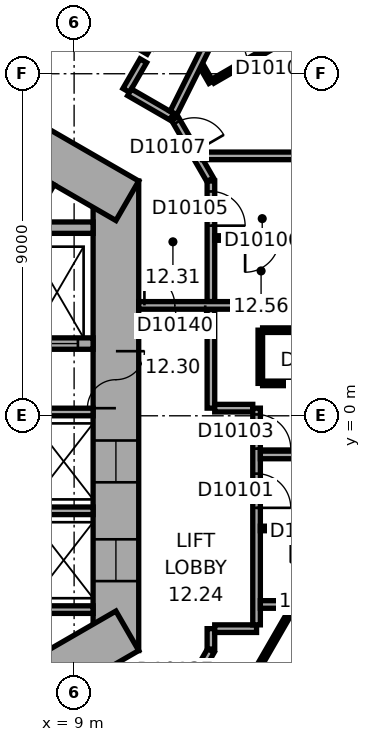
"""IFC4 building model, lengths in metres.
Left out: names, types, materials, properties, quantities, classifications, styles, units other than length and angle.
Written with IfcOpenShell. Run it as: python <this file> out.ifc"""

import sys

from ifc_helpers import new_model, si_unit, direction, frame, frame_2d, origin, place, context, subcontext, project, spatial, rectangle, extrude, element, fill, save


model = new_model("IFC4")
c1 = context("Model", 3, precision=1e-05, world=origin(), true_north=direction((0.0, 1.0)))
c2 = subcontext(c1, "Body", "Model", "MODEL_VIEW")
j1 = project(units=[si_unit("LENGTHUNIT", "METRE"), si_unit("PLANEANGLEUNIT", "RADIAN")], contexts=[c1])
p1 = place(None, origin())
s1 = spatial("IfcSite", under=j1, at=p1, CompositionType="ELEMENT")
p2 = place(p1, origin())
s2 = spatial("IfcBuilding", under=s1, at=p2, CompositionType="ELEMENT")
p3 = place(p2, frame((0.0, 0.0, 60.5)))
s3 = spatial("IfcBuildingStorey", under=s2, at=p3, CompositionType="ELEMENT", Elevation=60.5)
p4 = place(p3, frame((10.1, -6.177, 0.0), z_axis=(0.0, 0.0, 1.0), x_axis=(0.0, 1.0, 0.0)))
e1 = element("IfcWall", 1, at=p4, inside=s3, PredefinedType="SHEAR", context=c2, shape_type="SweptSolid", body=[
    extrude(rectangle(XDim=12.355, YDim=1.2, at=frame_2d((6.177, 0.0))), origin(), (0.0, 0.0, 1.0), 3.3),
])
p5 = place(p4, frame((6.378, 0.0, 0.0)))
e2 = element("IfcOpeningElement", 2, at=p5, cuts=e1, PredefinedType="OPENING", context=c2, shape_type="SweptSolid", body=[
    extrude(rectangle(XDim=1.5, YDim=2.1, at=frame_2d((0.75, 1.05))), frame((0.0, 0.61, 0.0), z_axis=(0.0, -1.0, 0.0), x_axis=(1.0, 0.0, 0.0)), (0.0, 0.0, 1.0), 1.22),
])
p6 = place(p4, frame((1.828, 0.0, 0.0)))
e3 = element("IfcOpeningElement", 3, at=p6, cuts=e1, PredefinedType="OPENING", context=c2, shape_type="SweptSolid", body=[
    extrude(rectangle(XDim=1.1, YDim=2.1, at=frame_2d((0.55, 1.05))), frame((0.0, 0.61, 0.0), z_axis=(0.0, -1.0, 0.0), x_axis=(1.0, 0.0, 0.0)), (0.0, 0.0, 1.0), 1.22),
])
p7 = place(p4, frame((4.427, 0.0, 0.0)))
e4 = element("IfcOpeningElement", 4, at=p7, cuts=e1, PredefinedType="OPENING", context=c2, shape_type="SweptSolid", body=[
    extrude(rectangle(XDim=1.1, YDim=2.1, at=frame_2d((0.55, 1.05))), frame((0.0, 0.61, 0.0), z_axis=(0.0, -1.0, 0.0), x_axis=(1.0, 0.0, 0.0)), (0.0, 0.0, 1.0), 1.22),
])
p8 = place(p3, frame((10.4, 5.658, 0.0), z_axis=(0.0, 0.0, 1.0), x_axis=(-0.866021384402, 0.500006961711, 0.0)))
e5 = element("IfcWall", 5, at=p8, inside=s3, PredefinedType="SHEAR", context=c2, shape_type="SweptSolid", body=[
    extrude(rectangle(XDim=12.355, YDim=1.2, at=frame_2d((6.178, 0.0))), origin(), (0.0, 0.0, 1.0), 3.3),
])
p9 = place(p8, frame((2.728, 0.0, 0.0)))
e6 = element("IfcOpeningElement", 6, at=p9, cuts=e5, PredefinedType="OPENING", context=c2, shape_type="SweptSolid", body=[
    extrude(rectangle(XDim=1.1, YDim=2.1, at=frame_2d((0.55, 1.05))), frame((0.0, 0.61, 0.0), z_axis=(0.0, -1.0, 0.0), x_axis=(1.0, 0.0, 0.0)), (0.0, 0.0, 1.0), 1.22),
])
p10 = place(p8, frame((5.328, 0.0, 0.0)))
e7 = element("IfcOpeningElement", 7, at=p10, cuts=e5, PredefinedType="OPENING", context=c2, shape_type="SweptSolid", body=[
    extrude(rectangle(XDim=1.1, YDim=2.1, at=frame_2d((0.55, 1.05))), frame((0.0, 0.61, 0.0), z_axis=(0.0, -1.0, 0.0), x_axis=(1.0, 0.0, 0.0)), (0.0, 0.0, 1.0), 1.22),
])
p11 = place(p8, frame((7.928, 0.0, 0.0)))
e8 = element("IfcOpeningElement", 8, at=p11, cuts=e5, PredefinedType="OPENING", context=c2, shape_type="SweptSolid", body=[
    extrude(rectangle(XDim=1.1, YDim=2.1, at=frame_2d((0.55, 1.05))), frame((0.0, 0.61, 0.0), z_axis=(0.0, -1.0, 0.0), x_axis=(1.0, 0.0, 0.0)), (0.0, 0.0, 1.0), 1.22),
])
p12 = place(p3, frame((-0.3, -11.836, 0.0), z_axis=(0.0, 0.0, 1.0), x_axis=(0.866021384402, 0.500006961711, 0.0)))
e9 = element("IfcWall", 9, at=p12, inside=s3, PredefinedType="SHEAR", context=c2, shape_type="SweptSolid", body=[
    extrude(rectangle(XDim=12.355, YDim=1.2, at=frame_2d((6.178, 0.0))), origin(), (0.0, 0.0, 1.0), 3.3),
])
p13 = place(p12, frame((4.128, 0.0, 0.0)))
e10 = element("IfcOpeningElement", 10, at=p13, cuts=e9, PredefinedType="OPENING", context=c2, shape_type="SweptSolid", body=[
    extrude(rectangle(XDim=0.9, YDim=2.1, at=frame_2d((0.45, 1.05))), frame((0.0, 0.61, 0.0), z_axis=(0.0, -1.0, 0.0), x_axis=(1.0, 0.0, 0.0)), (0.0, 0.0, 1.0), 1.22),
])
p14 = place(p12, frame((7.928, 0.0, 0.0)))
e11 = element("IfcOpeningElement", 11, at=p14, cuts=e9, PredefinedType="OPENING", context=c2, shape_type="SweptSolid", body=[
    extrude(rectangle(XDim=1.1, YDim=2.1, at=frame_2d((0.55, 1.05))), frame((0.0, 0.61, 0.0), z_axis=(0.0, -1.0, 0.0), x_axis=(1.0, 0.0, 0.0)), (0.0, 0.0, 1.0), 1.22),
])
for number, where, z_axis, x_axis in (
    (12, (7.3, -5.1, 0.0), (0.0, 0.0, 1.0), (1.0, 0.0, 0.0)),
    (13, (7.3, -2.5, 0.0), (0.0, 0.0, 1.0), (1.0, 0.0, 0.0)),
    (14, (7.3, 0.1, 0.0), (0.0, 0.0, 1.0), (1.0, 0.0, 0.0)),
    (15, (7.287, 4.222, 0.0), (0.0, 0.0, 1.0), (0.5, 0.866, 0.0)),
):
    element("IfcWall", number, at=place(p3, frame(where, z_axis=z_axis, x_axis=x_axis)), inside=s3, PredefinedType="PARTITIONING", context=c2, shape_type="SweptSolid", body=[
        extrude(rectangle(XDim=2.2, YDim=0.2, at=frame_2d((1.1, 0.0))), origin(), (0.0, 0.0, 1.0), 3.05),
    ])
p15 = place(p3, frame((7.3, 1.9, 0.0), z_axis=(0.0, 0.0, 1.0), x_axis=(1.0, 0.0, 0.0)))
e16 = element("IfcWall", 16, at=p15, inside=s3, PredefinedType="SHEAR", context=c2, shape_type="SweptSolid", body=[
    extrude(rectangle(XDim=2.2, YDim=0.3, at=frame_2d((1.1, 0.0))), origin(), (0.0, 0.0, 1.0), 3.05),
])
p16 = place(p15, frame((0.7, 0.0, 0.0)))
e17 = element("IfcOpeningElement", 17, at=p16, cuts=e16, PredefinedType="OPENING", context=c2, shape_type="SweptSolid", body=[
    extrude(rectangle(XDim=1.1, YDim=2.1, at=frame_2d((0.55, 1.05))), frame((0.0, 0.16, 0.0), z_axis=(0.0, -1.0, 0.0), x_axis=(1.0, 0.0, 0.0)), (0.0, 0.0, 1.0), 0.32),
])
p17 = place(p3, frame((7.3, 4.95, 0.0), z_axis=(0.0, 0.0, 1.0), x_axis=(1.0, 0.0, 0.0)))
e18 = element("IfcWall", 18, at=p17, inside=s3, PredefinedType="SHEAR", context=c2, shape_type="SweptSolid", body=[
    extrude(rectangle(XDim=2.2, YDim=0.3, at=frame_2d((1.1, 0.0))), origin(), (0.0, 0.0, 1.0), 3.05),
])
p18 = place(p3, frame((10.371, 8.561, 0.0), z_axis=(0.0, 0.0, 1.0), x_axis=(0.50004290449, 0.866000631449, 0.0)))
e19 = element("IfcWall", 19, at=p18, inside=s3, PredefinedType="PARTITIONING", context=c2, shape_type="SweptSolid", body=[
    extrude(rectangle(XDim=0.901, YDim=0.2, at=frame_2d((0.451, 0.0))), origin(), (0.0, 0.0, 1.0), 3.05),
])
p19 = place(p3, frame((10.972, 9.602, 0.0), z_axis=(0.0, 0.0, 1.0), x_axis=(-0.866033277307, 0.499986362411, 0.0)))
e20 = element("IfcWall", 20, at=p19, inside=s3, PredefinedType="PARTITIONING", context=c2, shape_type="SweptSolid", body=[
    extrude(rectangle(XDim=8.702, YDim=0.2, at=frame_2d((4.351, 0.0))), origin(), (0.0, 0.0, 1.0), 3.05),
])
p20 = place(p19, frame((4.364, 0.0, 0.0)))
e21 = element("IfcOpeningElement", 21, at=p20, cuts=e20, PredefinedType="OPENING", context=c2, shape_type="SweptSolid", body=[
    extrude(rectangle(XDim=0.9, YDim=2.1, at=frame_2d((0.45, 1.05))), frame((0.0, 0.11, 0.0), z_axis=(0.0, -1.0, 0.0), x_axis=(1.0, 0.0, 0.0)), (0.0, 0.0, 1.0), 0.22),
])
p21 = place(p3, frame((11.566, 7.871, 0.0), z_axis=(0.0, 0.0, 1.0), x_axis=(-0.866004557827, 0.500036104519, 0.0)))
e22 = element("IfcWall", 22, at=p21, inside=s3, PredefinedType="PARTITIONING", context=c2, shape_type="SweptSolid", body=[
    extrude(rectangle(XDim=1.28, YDim=0.2, at=frame_2d((0.64, 0.0))), origin(), (0.0, 0.0, 1.0), 3.05),
])
p22 = place(p3, frame((11.67, -7.788, 0.0), z_axis=(0.0, 0.0, 1.0), x_axis=(0.500063286585, 0.865988862174, 0.0)))
e23 = element("IfcWall", 23, at=p22, inside=s3, PredefinedType="PARTITIONING", context=c2, shape_type="SweptSolid", body=[
    extrude(rectangle(XDim=1.86, YDim=0.2, at=frame_2d((0.93, 0.0))), origin(), (0.0, 0.0, 1.0), 3.05),
])
p23 = place(p22, frame((0.48, 0.0, 0.0)))
e24 = element("IfcOpeningElement", 24, at=p23, cuts=e23, PredefinedType="OPENING", context=c2, shape_type="SweptSolid", body=[
    extrude(rectangle(XDim=0.9, YDim=2.1, at=frame_2d((0.45, 1.05))), frame((0.0, 0.11, 0.0), z_axis=(0.0, -1.0, 0.0), x_axis=(1.0, 0.0, 0.0)), (0.0, 0.0, 1.0), 0.22),
])
p24 = place(p3, frame((12.58, 6.212, 0.0), z_axis=(0.0, 0.0, 1.0), x_axis=(-0.500063286585, 0.865988862174, 0.0)))
e25 = element("IfcWall", 25, at=p24, inside=s3, PredefinedType="PARTITIONING", context=c2, shape_type="SweptSolid", body=[
    extrude(rectangle(XDim=1.86, YDim=0.2, at=frame_2d((0.93, 0.0))), origin(), (0.0, 0.0, 1.0), 3.05),
])
p25 = place(p24, frame((0.842, 0.0, 0.0)))
e26 = element("IfcOpeningElement", 26, at=p25, cuts=e25, PredefinedType="OPENING", context=c2, shape_type="SweptSolid", body=[
    extrude(rectangle(XDim=0.9, YDim=2.1, at=frame_2d((0.45, 1.05))), frame((0.0, 0.11, 0.0), z_axis=(0.0, -1.0, 0.0), x_axis=(1.0, 0.0, 0.0)), (0.0, 0.0, 1.0), 0.22),
])
p26 = place(p3, frame((12.6, -6.138, 0.0), z_axis=(0.0, 0.0, 1.0), x_axis=(0.0, 1.0, 0.0)))
e27 = element("IfcWall", 27, at=p26, inside=s3, PredefinedType="PARTITIONING", context=c2, shape_type="SweptSolid", body=[
    extrude(rectangle(XDim=0.537, YDim=0.2, at=frame_2d((0.268, 0.0))), origin(), (0.0, 0.0, 1.0), 3.05),
])
p27 = place(p3, frame((12.6, 0.201, 0.0), z_axis=(0.0, 0.0, 1.0), x_axis=(0.0, 1.0, 0.0)))
e28 = element("IfcWall", 28, at=p27, inside=s3, PredefinedType="PARTITIONING", context=c2, shape_type="SweptSolid", body=[
    extrude(rectangle(XDim=2.604, YDim=0.2, at=frame_2d((1.302, 0.0))), origin(), (0.0, 0.0, 1.0), 3.05),
])
p28 = place(p3, frame((12.6, 3.004, 0.0), z_axis=(0.0, 0.0, 1.0), x_axis=(0.0, 1.0, 0.0)))
e29 = element("IfcWall", 29, at=p28, inside=s3, PredefinedType="PARTITIONING", context=c2, shape_type="SweptSolid", body=[
    extrude(rectangle(XDim=3.173, YDim=0.2, at=frame_2d((1.586, 0.0))), origin(), (0.0, 0.0, 1.0), 3.05),
])
p29 = place(p28, frame((1.998, 0.0, 0.0)))
e30 = element("IfcOpeningElement", 30, at=p29, cuts=e29, PredefinedType="OPENING", context=c2, shape_type="SweptSolid", body=[
    extrude(rectangle(XDim=0.9, YDim=2.1, at=frame_2d((0.45, 1.05))), frame((0.0, 0.11, 0.0), z_axis=(0.0, -1.0, 0.0), x_axis=(1.0, 0.0, 0.0)), (0.0, 0.0, 1.0), 0.22),
])
p30 = place(p3, frame((12.601, 8.776, 0.0), z_axis=(0.0, 0.0, 1.0), x_axis=(-0.500166486798, 0.865929261247, 0.0)))
e31 = element("IfcWall", 31, at=p30, inside=s3, PredefinedType="PARTITIONING", context=c2, shape_type="SweptSolid", body=[
    extrude(rectangle(XDim=0.476, YDim=0.12, at=frame_2d((0.238, 0.0))), origin(), (0.0, 0.0, 1.0), 3.05),
])
p31 = place(p3, frame((12.7, -5.601, 0.0), z_axis=(0.0, 0.0, 1.0), x_axis=(1.0, 0.0, 0.0)))
e32 = element("IfcWall", 32, at=p31, inside=s3, PredefinedType="PARTITIONING", context=c2, shape_type="SweptSolid", body=[
    extrude(rectangle(XDim=1.101, YDim=0.2, at=frame_2d((0.551, 0.0))), origin(), (0.0, 0.0, 1.0), 3.05),
])
p32 = place(p3, frame((12.7, 4.677, 0.0), z_axis=(0.0, 0.0, 1.0), x_axis=(1.0, 0.0, 0.0)))
e33 = element("IfcWall", 33, at=p32, inside=s3, PredefinedType="PARTITIONING", context=c2, shape_type="SweptSolid", body=[
    extrude(rectangle(XDim=2.5, YDim=0.12, at=frame_2d((1.25, 0.0))), origin(), (0.0, 0.0, 1.0), 3.05),
])
p33 = place(p32, frame((0.8, 0.0, 0.0)))
e34 = element("IfcOpeningElement", 34, at=p33, cuts=e33, PredefinedType="OPENING", context=c2, shape_type="SweptSolid", body=[
    extrude(rectangle(XDim=0.9, YDim=2.1, at=frame_2d((0.45, 1.05))), frame((0.0, 0.07, 0.0), z_axis=(0.0, -1.0, 0.0), x_axis=(1.0, 0.0, 0.0)), (0.0, 0.0, 1.0), 0.14),
])
p34 = place(p3, frame((13.701, 0.201, 0.0), z_axis=(0.0, 0.0, 1.0), x_axis=(-1.0, 0.0, 0.0)))
e35 = element("IfcWall", 35, at=p34, inside=s3, PredefinedType="PARTITIONING", context=c2, shape_type="SweptSolid", body=[
    extrude(rectangle(XDim=1.001, YDim=0.2, at=frame_2d((0.5, 0.0))), origin(), (0.0, 0.0, 1.0), 3.05),
])
p35 = place(p3, frame((13.801, -5.501, 0.0), z_axis=(0.0, 0.0, 1.0), x_axis=(0.0, 1.0, 0.0)))
e36 = element("IfcWall", 36, at=p35, inside=s3, PredefinedType="PARTITIONING", context=c2, shape_type="SweptSolid", body=[
    extrude(rectangle(XDim=5.702, YDim=0.2, at=frame_2d((2.851, 0.0))), origin(), (0.0, 0.0, 1.0), 3.05),
])
p36 = place(p35, frame((3.079, 0.0, 0.0)))
e37 = element("IfcOpeningElement", 37, at=p36, cuts=e36, PredefinedType="OPENING", context=c2, shape_type="SweptSolid", body=[
    extrude(rectangle(XDim=0.9, YDim=2.1, at=frame_2d((0.45, 1.05))), frame((0.0, 0.11, 0.0), z_axis=(0.0, -1.0, 0.0), x_axis=(1.0, 0.0, 0.0)), (0.0, 0.0, 1.0), 0.22),
])
p37 = place(p35, frame((4.636, 0.0, 0.0)))
e38 = element("IfcOpeningElement", 38, at=p37, cuts=e36, PredefinedType="OPENING", context=c2, shape_type="SweptSolid", body=[
    extrude(rectangle(XDim=0.9, YDim=2.1, at=frame_2d((0.45, 1.05))), frame((0.0, 0.11, 0.0), z_axis=(0.0, -1.0, 0.0), x_axis=(1.0, 0.0, 0.0)), (0.0, 0.0, 1.0), 0.22),
])
p38 = place(p3, frame((13.901, -6.524, 0.0), z_axis=(0.0, 0.0, 1.0), x_axis=(0.499964162598, 0.86604609353, 0.0)))
e39 = element("IfcWall", 39, at=p38, inside=s3, PredefinedType="PARTITIONING", context=c2, shape_type="SweptSolid", body=[
    extrude(rectangle(XDim=1.661, YDim=0.12, at=frame_2d((0.831, 0.0))), origin(), (0.0, 0.0, 1.0), 3.05),
])
p39 = place(p3, frame((13.901, -4.965, 0.0), z_axis=(0.0, 0.0, 1.0), x_axis=(1.0, 0.0, 0.0)))
e40 = element("IfcWall", 40, at=p39, inside=s3, PredefinedType="PARTITIONING", context=c2, shape_type="SweptSolid", body=[
    extrude(rectangle(XDim=8.049, YDim=0.2, at=frame_2d((4.024, 0.0))), origin(), (0.0, 0.0, 1.0), 3.05),
])
p40 = place(p3, frame((13.901, -2.965, 0.0), z_axis=(0.0, 0.0, 1.0), x_axis=(1.0, 0.0, 0.0)))
e41 = element("IfcWall", 41, at=p40, inside=s3, PredefinedType="PARTITIONING", context=c2, shape_type="SweptSolid", body=[
    extrude(rectangle(XDim=2.5, YDim=0.12, at=frame_2d((1.25, 0.0))), origin(), (0.0, 0.0, 1.0), 3.05),
])
p41 = place(p40, frame((0.8, 0.0, 0.0)))
e42 = element("IfcOpeningElement", 42, at=p41, cuts=e41, PredefinedType="OPENING", context=c2, shape_type="SweptSolid", body=[
    extrude(rectangle(XDim=0.9, YDim=2.1, at=frame_2d((0.45, 1.05))), frame((0.0, 0.07, 0.0), z_axis=(0.0, -1.0, 0.0), x_axis=(1.0, 0.0, 0.0)), (0.0, 0.0, 1.0), 0.14),
])
p42 = place(p3, frame((13.9, 0.853, 0.0), z_axis=(0.0, 0.0, 1.0), x_axis=(0.0, 1.0, 0.0)))
e43 = element("IfcWall", 43, at=p42, inside=s3, PredefinedType="PARTITIONING", context=c2, shape_type="SweptSolid", body=[
    extrude(rectangle(XDim=1.4, YDim=0.12, at=frame_2d((0.7, 0.0))), origin(), (0.0, 0.0, 1.0), 3.05),
])
p43 = place(p3, frame((13.96, 2.253, 0.0), z_axis=(0.0, 0.0, 1.0), x_axis=(1.0, 0.0, 0.0)))
e44 = element("IfcWall", 44, at=p43, inside=s3, PredefinedType="PARTITIONING", context=c2, shape_type="SweptSolid", body=[
    extrude(rectangle(XDim=2.94, YDim=0.12, at=frame_2d((1.47, 0.0))), origin(), (0.0, 0.0, 1.0), 3.05),
])
p44 = place(p3, frame((14.974, 10.146, 0.0), z_axis=(0.0, 0.0, 1.0), x_axis=(-0.86599746015, -0.500048396672, 0.0)))
e45 = element("IfcWall", 45, at=p44, inside=s3, PredefinedType="PARTITIONING", context=c2, shape_type="SweptSolid", body=[
    extrude(rectangle(XDim=2.68, YDim=0.12, at=frame_2d((1.34, 0.0))), origin(), (0.0, 0.0, 1.0), 3.05),
])
p45 = place(p44, frame((0.69, 0.0, 0.0)))
e46 = element("IfcOpeningElement", 46, at=p45, cuts=e45, PredefinedType="OPENING", context=c2, shape_type="SweptSolid", body=[
    extrude(rectangle(XDim=0.9, YDim=2.1, at=frame_2d((0.45, 1.05))), frame((0.0, 0.07, 0.0), z_axis=(0.0, -1.0, 0.0), x_axis=(1.0, 0.0, 0.0)), (0.0, 0.0, 1.0), 0.14),
])
p46 = place(p3, frame((15.915, 16.592, 0.0), z_axis=(0.0, 0.0, 1.0), x_axis=(-0.446199736347, -0.894933402709, 0.0)))
e47 = element("IfcWall", 47, at=p46, inside=s3, PredefinedType="PARTITIONING", context=c2, shape_type="SweptSolid", body=[
    extrude(rectangle(XDim=9.635, YDim=0.2, at=frame_2d((4.817, 0.0))), origin(), (0.0, 0.0, 1.0), 3.05),
])
p47 = place(p3, frame((16.9, 0.853, 0.0), z_axis=(0.0, 0.0, 1.0), x_axis=(-1.0, 0.0, 0.0)))
e48 = element("IfcWall", 48, at=p47, inside=s3, PredefinedType="PARTITIONING", context=c2, shape_type="SweptSolid", body=[
    extrude(rectangle(XDim=2.94, YDim=0.12, at=frame_2d((1.47, 0.0))), origin(), (0.0, 0.0, 1.0), 3.05),
])
p48 = place(p47, frame((1.02, 0.0, 0.0)))
e49 = element("IfcOpeningElement", 49, at=p48, cuts=e48, PredefinedType="OPENING", context=c2, shape_type="SweptSolid", body=[
    extrude(rectangle(XDim=0.9, YDim=2.1, at=frame_2d((0.45, 1.05))), frame((0.0, 0.07, 0.0), z_axis=(0.0, -1.0, 0.0), x_axis=(1.0, 0.0, 0.0)), (0.0, 0.0, 1.0), 0.14),
])
p49 = place(p3, frame((21.95, -1.03, 0.0), z_axis=(0.0, 0.0, 1.0), x_axis=(-1.0, 0.0, 0.0)))
e50 = element("IfcWall", 50, at=p49, inside=s3, PredefinedType="PARTITIONING", context=c2, shape_type="SweptSolid", body=[
    extrude(rectangle(XDim=8.049, YDim=0.2, at=frame_2d((4.024, 0.0))), origin(), (0.0, 0.0, 1.0), 2.6),
])
p50 = place(p3, frame((21.95, 2.905, 0.0), z_axis=(0.0, 0.0, 1.0), x_axis=(-1.0, 0.0, 0.0)))
e51 = element("IfcWall", 51, at=p50, inside=s3, PredefinedType="PARTITIONING", context=c2, shape_type="SweptSolid", body=[
    extrude(rectangle(XDim=11.25, YDim=0.2, at=frame_2d((5.625, 0.0))), origin(), (0.0, 0.0, 1.0), 3.05),
])
p51 = place(p50, frame((9.5, 0.0, 0.0)))
e52 = element("IfcOpeningElement", 52, at=p51, cuts=e51, PredefinedType="OPENING", context=c2, shape_type="SweptSolid", body=[
    extrude(rectangle(XDim=1.6, YDim=2.1, at=frame_2d((0.8, 1.05))), frame((0.0, 0.11, 0.0), z_axis=(0.0, -1.0, 0.0), x_axis=(1.0, 0.0, 0.0)), (0.0, 0.0, 1.0), 0.22),
])
p52 = place(p3, frame((21.95, 6.839, 0.0), z_axis=(0.0, 0.0, 1.0), x_axis=(-1.0, 0.0, 0.0)))
e53 = element("IfcWall", 53, at=p52, inside=s3, PredefinedType="PARTITIONING", context=c2, shape_type="SweptSolid", body=[
    extrude(rectangle(XDim=9.572, YDim=0.2, at=frame_2d((4.786, 0.0))), origin(), (0.0, 0.0, 1.0), 3.05),
])
p53 = place(p5, origin())
e54 = element("IfcDoor", 54, at=p53, inside=s3, OperationType="DOUBLE_DOOR_SINGLE_SWING", PredefinedType="DOOR", context=c2, shape_type="SweptSolid", body=[
    extrude(rectangle(XDim=1.5, YDim=2.1, at=frame_2d((0.75, 1.05))), frame((0.0, 0.025, 0.0), z_axis=(0.0, -1.0, 0.0), x_axis=(1.0, 0.0, 0.0)), (0.0, 0.0, 1.0), 0.05),
])
fill(e2, e54)
p54 = place(p16, origin())
e55 = element("IfcDoor", 55, at=p54, inside=s3, OperationType="DOUBLE_DOOR_SLIDING", PredefinedType="DOOR", context=c2, shape_type="SweptSolid", body=[
    extrude(rectangle(XDim=1.1, YDim=2.1, at=frame_2d((0.55, 1.05))), frame((0.0, 0.025, 0.0), z_axis=(0.0, -1.0, 0.0), x_axis=(1.0, 0.0, 0.0)), (0.0, 0.0, 1.0), 0.05),
])
fill(e17, e55)
p55 = place(p6, origin())
e56 = element("IfcDoor", 56, at=p55, inside=s3, OperationType="DOUBLE_DOOR_SLIDING", PredefinedType="DOOR", context=c2, shape_type="SweptSolid", body=[
    extrude(rectangle(XDim=1.1, YDim=2.1, at=frame_2d((0.55, 1.05))), frame((0.0, 0.025, 0.0), z_axis=(0.0, -1.0, 0.0), x_axis=(1.0, 0.0, 0.0)), (0.0, 0.0, 1.0), 0.05),
])
fill(e3, e56)
p56 = place(p7, origin())
e57 = element("IfcDoor", 57, at=p56, inside=s3, OperationType="DOUBLE_DOOR_SLIDING", PredefinedType="DOOR", context=c2, shape_type="SweptSolid", body=[
    extrude(rectangle(XDim=1.1, YDim=2.1, at=frame_2d((0.55, 1.05))), frame((0.0, 0.025, 0.0), z_axis=(0.0, -1.0, 0.0), x_axis=(1.0, 0.0, 0.0)), (0.0, 0.0, 1.0), 0.05),
])
fill(e4, e57)
p57 = place(p36, origin())
e58 = element("IfcDoor", 58, at=p57, inside=s3, OperationType="SINGLE_SWING_LEFT", PredefinedType="DOOR", context=c2, shape_type="SweptSolid", body=[
    extrude(rectangle(XDim=0.9, YDim=2.1, at=frame_2d((0.45, 1.05))), frame((0.0, 0.025, 0.0), z_axis=(0.0, -1.0, 0.0), x_axis=(1.0, 0.0, 0.0)), (0.0, 0.0, 1.0), 0.05),
])
fill(e37, e58)
p58 = place(p37, origin())
e59 = element("IfcDoor", 59, at=p58, inside=s3, OperationType="SINGLE_SWING_LEFT", PredefinedType="DOOR", context=c2, shape_type="SweptSolid", body=[
    extrude(rectangle(XDim=0.9, YDim=2.1, at=frame_2d((0.45, 1.05))), frame((0.0, 0.025, 0.0), z_axis=(0.0, -1.0, 0.0), x_axis=(1.0, 0.0, 0.0)), (0.0, 0.0, 1.0), 0.05),
])
fill(e38, e59)
p59 = place(p29, origin())
e60 = element("IfcDoor", 60, at=p59, inside=s3, OperationType="SINGLE_SWING_LEFT", PredefinedType="DOOR", context=c2, shape_type="SweptSolid", body=[
    extrude(rectangle(XDim=0.9, YDim=2.1, at=frame_2d((0.45, 1.05))), frame((0.0, 0.025, 0.0), z_axis=(0.0, -1.0, 0.0), x_axis=(1.0, 0.0, 0.0)), (0.0, 0.0, 1.0), 0.05),
])
fill(e30, e60)
p60 = place(p33, origin())
e61 = element("IfcDoor", 61, at=p60, inside=s3, OperationType="SINGLE_SWING_LEFT", PredefinedType="DOOR", context=c2, shape_type="SweptSolid", body=[
    extrude(rectangle(XDim=0.9, YDim=2.1, at=frame_2d((0.45, 1.05))), frame((0.0, 0.025, 0.0), z_axis=(0.0, -1.0, 0.0), x_axis=(1.0, 0.0, 0.0)), (0.0, 0.0, 1.0), 0.05),
])
fill(e34, e61)
p61 = place(p25, origin())
e62 = element("IfcDoor", 62, at=p61, inside=s3, OperationType="SINGLE_SWING_LEFT", PredefinedType="DOOR", context=c2, shape_type="SweptSolid", body=[
    extrude(rectangle(XDim=0.9, YDim=2.1, at=frame_2d((0.45, 1.05))), frame((0.0, 0.025, 0.0), z_axis=(0.0, -1.0, 0.0), x_axis=(1.0, 0.0, 0.0)), (0.0, 0.0, 1.0), 0.05),
])
fill(e26, e62)
p62 = place(p45, origin())
e63 = element("IfcDoor", 63, at=p62, inside=s3, OperationType="SINGLE_SWING_LEFT", PredefinedType="DOOR", context=c2, shape_type="SweptSolid", body=[
    extrude(rectangle(XDim=0.9, YDim=2.1, at=frame_2d((0.45, 1.05))), frame((0.0, 0.025, 0.0), z_axis=(0.0, -1.0, 0.0), x_axis=(1.0, 0.0, 0.0)), (0.0, 0.0, 1.0), 0.05),
])
fill(e46, e63)
p63 = place(p51, origin())
e64 = element("IfcDoor", 64, at=p63, inside=s3, OperationType="DOUBLE_DOOR_SINGLE_SWING", PredefinedType="DOOR", context=c2, shape_type="SweptSolid", body=[
    extrude(rectangle(XDim=1.6, YDim=2.1, at=frame_2d((0.8, 1.05))), frame((0.0, 0.025, 0.0), z_axis=(0.0, -1.0, 0.0), x_axis=(1.0, 0.0, 0.0)), (0.0, 0.0, 1.0), 0.05),
])
fill(e52, e64)
save(model, sys.argv[1])
